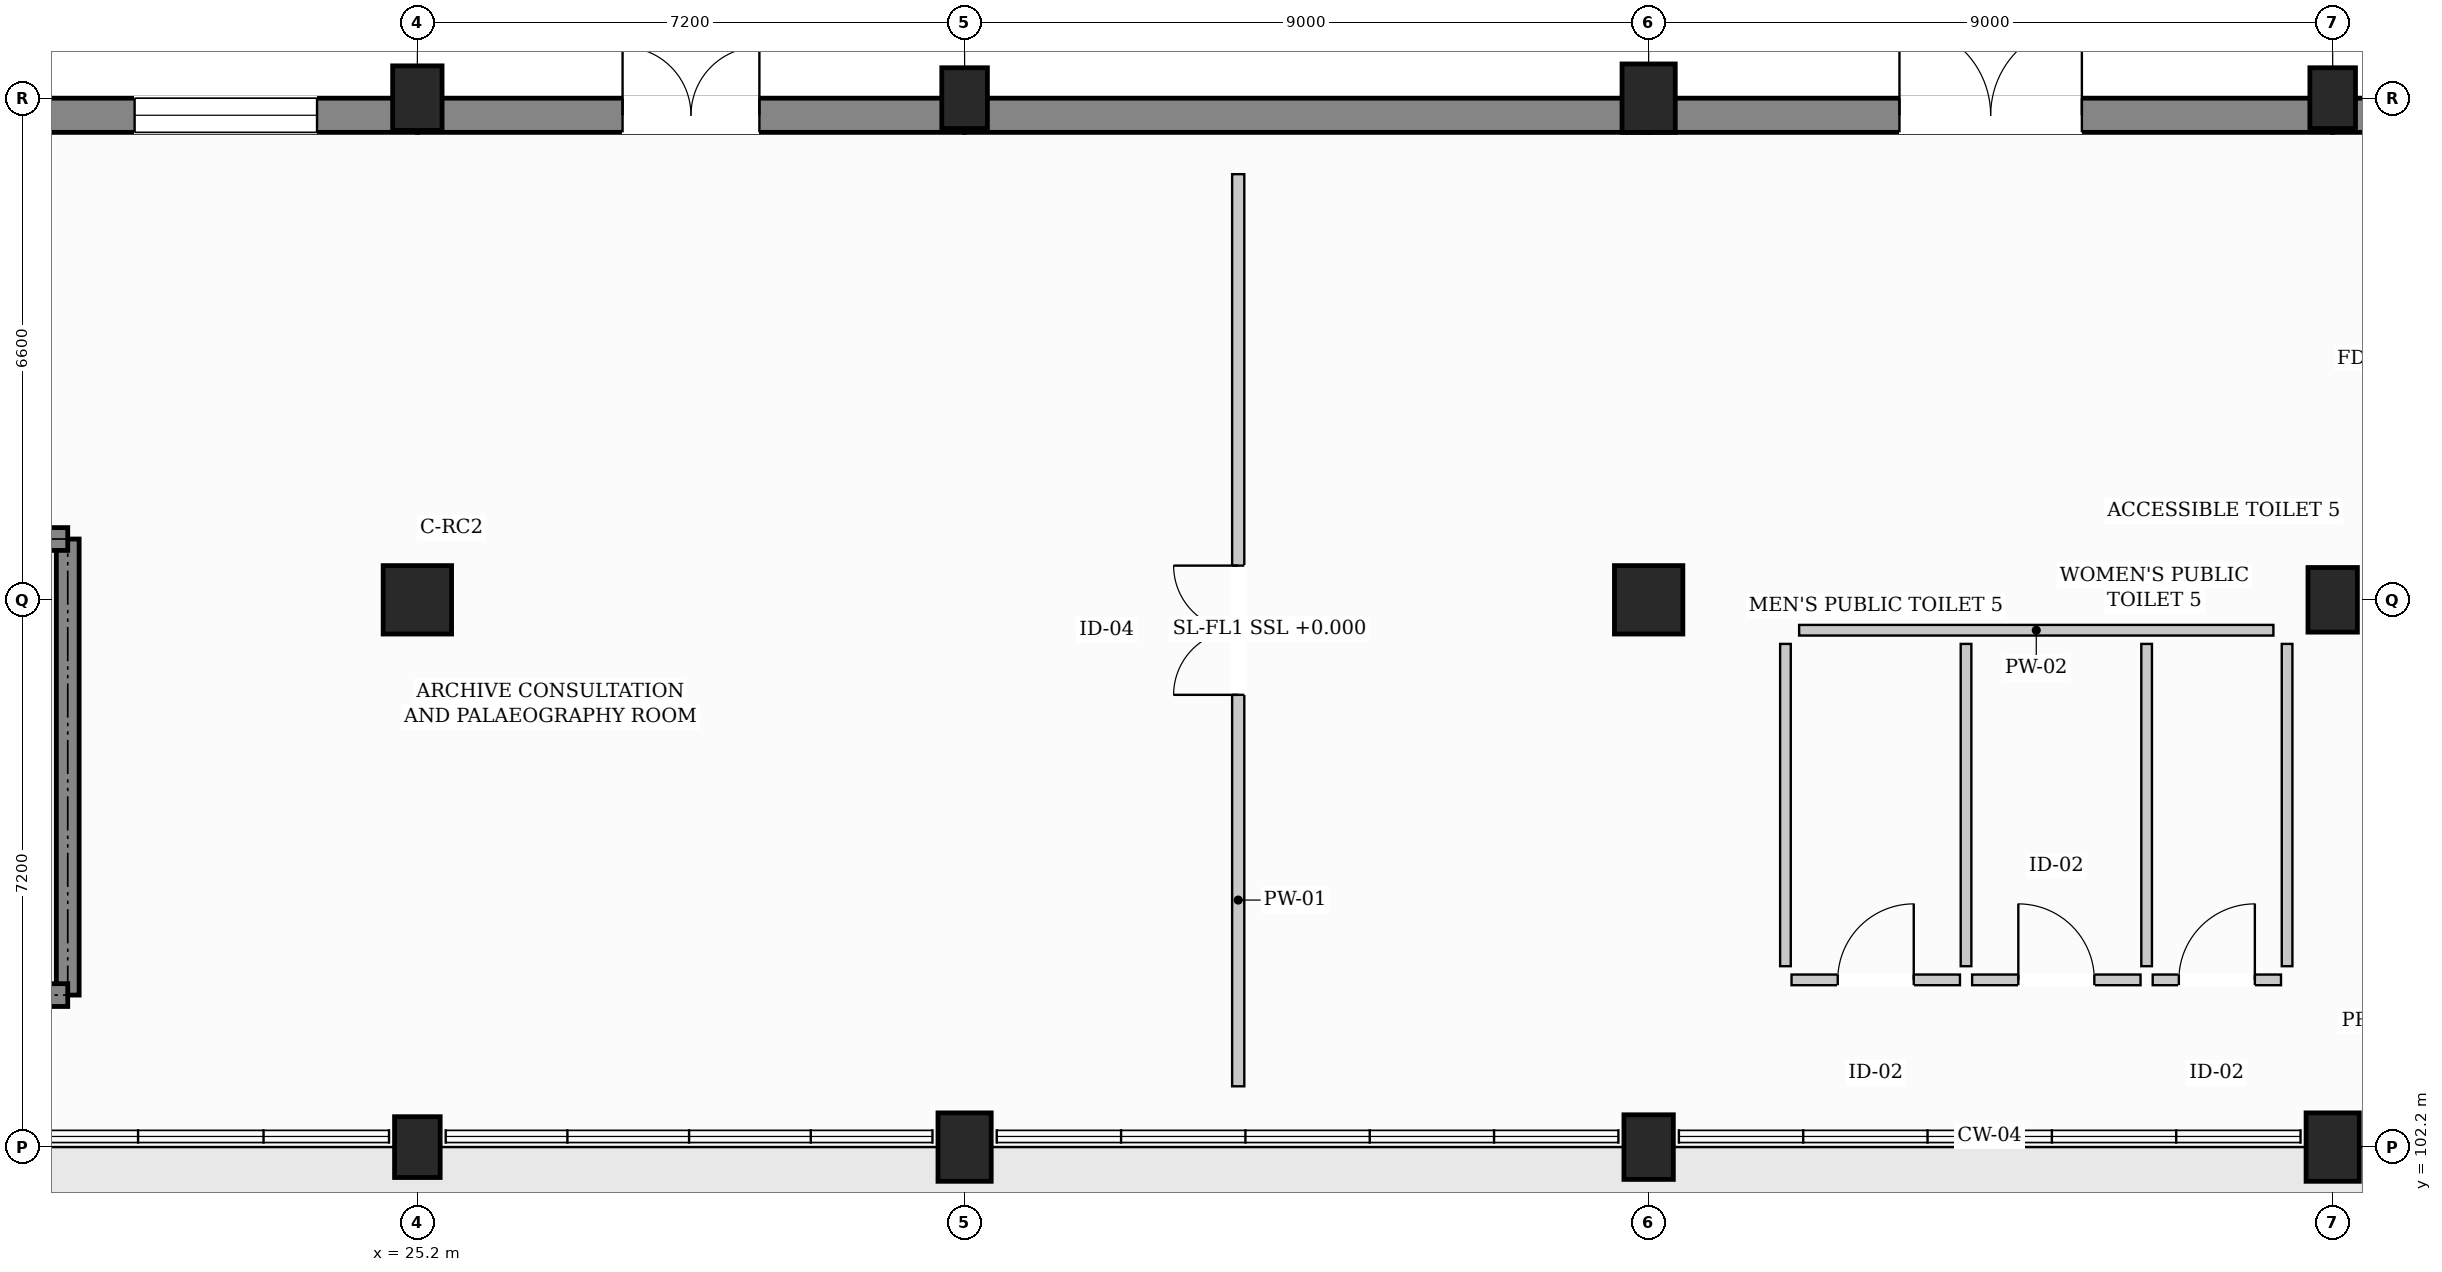
"""IFC4 building model, lengths in metres.
Left out: names, types, materials, properties, quantities, classifications, styles, units other than length and angle.
Written with IfcOpenShell. Run it as: python <this file> out.ifc"""

import sys

from ifc_helpers import new_model, si_unit, direction, frame, frame_2d, origin, origin_2d, place, context, subcontext, project, spatial, rectangle, extrude, element, fill, save


model = new_model("IFC4")
c1 = context("Model", 3, precision=1e-05, world=origin(), true_north=direction((0.0, 1.0)))
c2 = subcontext(c1, "Body", "Model", "MODEL_VIEW")
j1 = project(units=[si_unit("LENGTHUNIT", "METRE"), si_unit("PLANEANGLEUNIT", "RADIAN")], contexts=[c1])
p1 = place(None, origin())
s1 = spatial("IfcSite", under=j1, at=p1, CompositionType="ELEMENT")
p2 = place(p1, origin())
s2 = spatial("IfcBuilding", under=s1, at=p2, CompositionType="ELEMENT")
p3 = place(p2, origin())
s3 = spatial("IfcBuildingStorey", under=s2, at=p3, CompositionType="ELEMENT", Elevation=0.0)
p4 = place(p3, frame((25.2, 102.2, 0.0), z_axis=(0.0, 0.0, 1.0), x_axis=(1.0, 0.0, 0.0)))
e1 = element("IfcColumn", 1, at=p4, inside=s3, PredefinedType="COLUMN", context=c2, shape_type="SweptSolid", body=[
    extrude(rectangle(XDim=0.6, YDim=0.8, at=origin_2d()), origin(), (0.0, 0.0, 1.0), 5.1),
])
p5 = place(p3, frame((25.2, 109.4, 0.0), z_axis=(0.0, 0.0, 1.0), x_axis=(1.0, 0.0, 0.0)))
e2 = element("IfcColumn", 2, at=p5, inside=s3, PredefinedType="COLUMN", context=c2, shape_type="SweptSolid", body=[
    extrude(rectangle(XDim=0.9, YDim=0.9, at=origin_2d()), origin(), (0.0, 0.0, 1.0), 5.1),
])
p6 = place(p3, frame((25.2, 116.0, 0.0), z_axis=(0.0, 0.0, 1.0), x_axis=(1.0, 0.0, 0.0)))
e3 = element("IfcColumn", 3, at=p6, inside=s3, PredefinedType="COLUMN", context=c2, shape_type="SweptSolid", body=[
    extrude(rectangle(XDim=0.65, YDim=0.85, at=origin_2d()), origin(), (0.0, 0.0, 1.0), 5.1),
])
p7 = place(p3, frame((32.4, 102.2, 0.0), z_axis=(0.0, 0.0, 1.0), x_axis=(1.0, 0.0, 0.0)))
e4 = element("IfcColumn", 4, at=p7, inside=s3, PredefinedType="COLUMN", context=c2, shape_type="SweptSolid", body=[
    extrude(rectangle(XDim=0.7, YDim=0.9, at=origin_2d()), origin(), (0.0, 0.0, 1.0), 5.1),
])
p8 = place(p3, frame((32.4, 116.0, 0.0), z_axis=(0.0, 0.0, 1.0), x_axis=(1.0, 0.0, 0.0)))
e5 = element("IfcColumn", 5, at=p8, inside=s3, PredefinedType="COLUMN", context=c2, shape_type="SweptSolid", body=[
    extrude(rectangle(XDim=0.6, YDim=0.8, at=origin_2d()), origin(), (0.0, 0.0, 1.0), 5.1),
])
p9 = place(p3, frame((41.4, 102.2, 0.0), z_axis=(0.0, 0.0, 1.0), x_axis=(1.0, 0.0, 0.0)))
e6 = element("IfcColumn", 6, at=p9, inside=s3, PredefinedType="COLUMN", context=c2, shape_type="SweptSolid", body=[
    extrude(rectangle(XDim=0.65, YDim=0.85, at=origin_2d()), origin(), (0.0, 0.0, 1.0), 5.1),
])
p10 = place(p3, frame((41.4, 109.4, 0.0), z_axis=(0.0, 0.0, 1.0), x_axis=(1.0, 0.0, 0.0)))
e7 = element("IfcColumn", 7, at=p10, inside=s3, PredefinedType="COLUMN", context=c2, shape_type="SweptSolid", body=[
    extrude(rectangle(XDim=0.9, YDim=0.9, at=origin_2d()), origin(), (0.0, 0.0, 1.0), 5.1),
])
for number, where, z_axis, x_axis in (
    (8, (41.4, 116.0, 0.0), (0.0, 0.0, 1.0), (1.0, 0.0, 0.0)),
    (9, (50.4, 102.2, 0.0), (0.0, 0.0, 1.0), (1.0, 0.0, 0.0)),
):
    element("IfcColumn", number, at=place(p3, frame(where, z_axis=z_axis, x_axis=x_axis)), inside=s3, PredefinedType="COLUMN", context=c2, shape_type="SweptSolid", body=[
        extrude(rectangle(XDim=0.7, YDim=0.9, at=origin_2d()), origin(), (0.0, 0.0, 1.0), 5.1),
    ])
p11 = place(p3, frame((50.4, 109.4, 0.0), z_axis=(0.0, 0.0, 1.0), x_axis=(1.0, 0.0, 0.0)))
e10 = element("IfcColumn", 10, at=p11, inside=s3, PredefinedType="COLUMN", context=c2, shape_type="SweptSolid", body=[
    extrude(rectangle(XDim=0.65, YDim=0.85, at=origin_2d()), origin(), (0.0, 0.0, 1.0), 5.1),
])
p12 = place(p3, frame((50.4, 116.0, 0.0), z_axis=(0.0, 0.0, 1.0), x_axis=(1.0, 0.0, 0.0)))
e11 = element("IfcColumn", 11, at=p12, inside=s3, PredefinedType="COLUMN", context=c2, shape_type="SweptSolid", body=[
    extrude(rectangle(XDim=0.6, YDim=0.8, at=origin_2d()), origin(), (0.0, 0.0, 1.0), 5.1),
])
p13 = place(p3, frame((16.2, 115.775, 0.0), z_axis=(0.0, 0.0, 1.0), x_axis=(1.0, 0.0, 0.0)))
e12 = element("IfcWall", 12, at=p13, inside=s3, PredefinedType="SOLIDWALL", context=c2, shape_type="SweptSolid", body=[
    extrude(rectangle(XDim=9.0, YDim=0.45, at=frame_2d((4.5, 0.0))), origin(), (0.0, 0.0, 1.0), 4.82),
])
p14 = place(p13, frame((1.32, 0.0, 0.85)))
e13 = element("IfcOpeningElement", 13, at=p14, cuts=e12, PredefinedType="OPENING", context=c2, shape_type="SweptSolid", body=[
    extrude(rectangle(XDim=2.4, YDim=2.8, at=frame_2d((1.2, 1.4))), frame((0.0, 0.235, 0.0), z_axis=(0.0, -1.0, 0.0), x_axis=(1.0, 0.0, 0.0)), (0.0, 0.0, 1.0), 0.47),
])
p15 = place(p13, frame((5.28, 0.0, 0.85)))
e14 = element("IfcOpeningElement", 14, at=p15, cuts=e12, PredefinedType="OPENING", context=c2, shape_type="SweptSolid", body=[
    extrude(rectangle(XDim=2.4, YDim=2.8, at=frame_2d((1.2, 1.4))), frame((0.0, 0.235, 0.0), z_axis=(0.0, -1.0, 0.0), x_axis=(1.0, 0.0, 0.0)), (0.0, 0.0, 1.0), 0.47),
])
p16 = place(p3, frame((25.2, 115.775, 0.0), z_axis=(0.0, 0.0, 1.0), x_axis=(1.0, 0.0, 0.0)))
e15 = element("IfcWall", 15, at=p16, inside=s3, PredefinedType="SOLIDWALL", context=c2, shape_type="SweptSolid", body=[
    extrude(rectangle(XDim=7.2, YDim=0.45, at=frame_2d((3.6, 0.0))), origin(), (0.0, 0.0, 1.0), 4.82),
])
p17 = place(p16, frame((2.7, 0.0, 0.0)))
e16 = element("IfcOpeningElement", 16, at=p17, cuts=e15, PredefinedType="OPENING", context=c2, shape_type="SweptSolid", body=[
    extrude(rectangle(XDim=1.8, YDim=2.4, at=frame_2d((0.9, 1.2))), frame((0.0, 0.235, 0.0), z_axis=(0.0, -1.0, 0.0), x_axis=(1.0, 0.0, 0.0)), (0.0, 0.0, 1.0), 0.47),
])
p18 = place(p3, frame((32.4, 115.775, 0.0), z_axis=(0.0, 0.0, 1.0), x_axis=(1.0, 0.0, 0.0)))
e17 = element("IfcWall", 17, at=p18, inside=s3, PredefinedType="SOLIDWALL", context=c2, shape_type="SweptSolid", body=[
    extrude(rectangle(XDim=9.0, YDim=0.45, at=frame_2d((4.5, 0.0))), origin(), (0.0, 0.0, 1.0), 4.82),
])
p19 = place(p3, frame((41.4, 115.775, 0.0), z_axis=(0.0, 0.0, 1.0), x_axis=(1.0, 0.0, 0.0)))
e18 = element("IfcWall", 18, at=p19, inside=s3, PredefinedType="SOLIDWALL", context=c2, shape_type="SweptSolid", body=[
    extrude(rectangle(XDim=9.0, YDim=0.45, at=frame_2d((4.5, 0.0))), origin(), (0.0, 0.0, 1.0), 4.82),
])
p20 = place(p19, frame((3.3, 0.0, 0.0)))
e19 = element("IfcOpeningElement", 19, at=p20, cuts=e18, PredefinedType="OPENING", context=c2, shape_type="SweptSolid", body=[
    extrude(rectangle(XDim=2.4, YDim=2.7, at=frame_2d((1.2, 1.35))), frame((0.0, 0.235, 0.0), z_axis=(0.0, -1.0, 0.0), x_axis=(1.0, 0.0, 0.0)), (0.0, 0.0, 1.0), 0.47),
])
p21 = place(p3, frame((50.4, 115.775, 0.0), z_axis=(0.0, 0.0, 1.0), x_axis=(1.0, 0.0, 0.0)))
e20 = element("IfcWall", 20, at=p21, inside=s3, PredefinedType="SOLIDWALL", context=c2, shape_type="SweptSolid", body=[
    extrude(rectangle(XDim=7.2, YDim=0.45, at=frame_2d((3.6, 0.0))), origin(), (0.0, 0.0, 1.0), 4.82),
])
p22 = place(p21, frame((1.066, 0.0, 0.85)))
e21 = element("IfcOpeningElement", 21, at=p22, cuts=e20, PredefinedType="OPENING", context=c2, shape_type="SweptSolid", body=[
    extrude(rectangle(XDim=1.9, YDim=2.5, at=frame_2d((0.95, 1.25))), frame((0.0, 0.235, 0.0), z_axis=(0.0, -1.0, 0.0), x_axis=(1.0, 0.0, 0.0)), (0.0, 0.0, 1.0), 0.47),
])
p23 = place(p21, frame((4.234, 0.0, 0.85)))
e22 = element("IfcOpeningElement", 22, at=p23, cuts=e20, PredefinedType="OPENING", context=c2, shape_type="SweptSolid", body=[
    extrude(rectangle(XDim=1.9, YDim=2.5, at=frame_2d((0.95, 1.25))), frame((0.0, 0.235, 0.0), z_axis=(0.0, -1.0, 0.0), x_axis=(1.0, 0.0, 0.0)), (0.0, 0.0, 1.0), 0.47),
])
p24 = place(p3, frame((20.6, 104.2, 0.0), z_axis=(0.0, 0.0, 1.0), x_axis=(0.0, 1.0, 0.0)))
e23 = element("IfcWall", 23, at=p24, inside=s3, PredefinedType="SHEAR", context=c2, shape_type="SweptSolid", body=[
    extrude(rectangle(XDim=6.0, YDim=0.3, at=frame_2d((3.0, 0.0))), origin(), (0.0, 0.0, 1.0), 4.82),
])
for number, where, z_axis, x_axis in (
    (24, (13.6, 104.2, 0.0), (0.0, 0.0, 1.0), (1.0, 0.0, 0.0)),
    (25, (13.6, 110.2, 0.0), (0.0, 0.0, 1.0), (1.0, 0.0, 0.0)),
):
    element("IfcWall", number, at=place(p3, frame(where, z_axis=z_axis, x_axis=x_axis)), inside=s3, PredefinedType="SHEAR", context=c2, shape_type="SweptSolid", body=[
        extrude(rectangle(XDim=7.0, YDim=0.3, at=frame_2d((3.5, 0.0))), origin(), (0.0, 0.0, 1.0), 4.82),
    ])
p25 = place(p3, frame((43.38, 109.0, 0.0), z_axis=(0.0, 0.0, 1.0), x_axis=(1.0, 0.0, 0.0)))
e26 = element("IfcWall", 26, at=p25, inside=s3, PredefinedType="PARTITIONING", context=c2, shape_type="SweptSolid", body=[
    extrude(rectangle(XDim=6.24, YDim=0.14, at=frame_2d((3.12, 0.0))), origin(), (0.0, 0.0, 1.0), 4.6),
])
for number, where, z_axis, x_axis in (
    (27, (43.2, 104.58, 0.0), (0.0, 0.0, 1.0), (0.0, 1.0, 0.0)),
    (28, (49.8, 104.58, 0.0), (0.0, 0.0, 1.0), (0.0, 1.0, 0.0)),
    (29, (45.576, 104.58, 0.0), (0.0, 0.0, 1.0), (0.0, 1.0, 0.0)),
    (30, (47.952, 104.58, 0.0), (0.0, 0.0, 1.0), (0.0, 1.0, 0.0)),
):
    element("IfcWall", number, at=place(p3, frame(where, z_axis=z_axis, x_axis=x_axis)), inside=s3, PredefinedType="PARTITIONING", context=c2, shape_type="SweptSolid", body=[
        extrude(rectangle(XDim=4.24, YDim=0.14, at=frame_2d((2.12, 0.0))), origin(), (0.0, 0.0, 1.0), 4.82),
    ])
p26 = place(p3, frame((43.28, 104.4, 0.0), z_axis=(0.0, 0.0, 1.0), x_axis=(1.0, 0.0, 0.0)))
e31 = element("IfcWall", 31, at=p26, inside=s3, PredefinedType="PARTITIONING", context=c2, shape_type="SweptSolid", body=[
    extrude(rectangle(XDim=2.216, YDim=0.14, at=frame_2d((1.108, 0.0))), origin(), (0.0, 0.0, 1.0), 4.82),
])
p27 = place(p26, frame((0.608, 0.0, 0.0)))
e32 = element("IfcOpeningElement", 32, at=p27, cuts=e31, PredefinedType="OPENING", context=c2, shape_type="SweptSolid", body=[
    extrude(rectangle(XDim=1.0, YDim=2.15, at=frame_2d((0.5, 1.075))), frame((0.0, 0.08, 0.0), z_axis=(0.0, -1.0, 0.0), x_axis=(1.0, 0.0, 0.0)), (0.0, 0.0, 1.0), 0.16),
])
p28 = place(p3, frame((45.656, 104.4, 0.0), z_axis=(0.0, 0.0, 1.0), x_axis=(1.0, 0.0, 0.0)))
e33 = element("IfcWall", 33, at=p28, inside=s3, PredefinedType="PARTITIONING", context=c2, shape_type="SweptSolid", body=[
    extrude(rectangle(XDim=2.216, YDim=0.14, at=frame_2d((1.108, 0.0))), origin(), (0.0, 0.0, 1.0), 4.6),
])
p29 = place(p28, frame((0.608, 0.0, 0.0)))
e34 = element("IfcOpeningElement", 34, at=p29, cuts=e33, PredefinedType="OPENING", context=c2, shape_type="SweptSolid", body=[
    extrude(rectangle(XDim=1.0, YDim=2.15, at=frame_2d((0.5, 1.075))), frame((0.0, 0.08, 0.0), z_axis=(0.0, -1.0, 0.0), x_axis=(1.0, 0.0, 0.0)), (0.0, 0.0, 1.0), 0.16),
])
p30 = place(p3, frame((48.032, 104.4, 0.0), z_axis=(0.0, 0.0, 1.0), x_axis=(1.0, 0.0, 0.0)))
e35 = element("IfcWall", 35, at=p30, inside=s3, PredefinedType="PARTITIONING", context=c2, shape_type="SweptSolid", body=[
    extrude(rectangle(XDim=1.688, YDim=0.14, at=frame_2d((0.844, 0.0))), origin(), (0.0, 0.0, 1.0), 4.82),
])
p31 = place(p30, frame((0.344, 0.0, 0.0)))
e36 = element("IfcOpeningElement", 36, at=p31, cuts=e35, PredefinedType="OPENING", context=c2, shape_type="SweptSolid", body=[
    extrude(rectangle(XDim=1.0, YDim=2.15, at=frame_2d((0.5, 1.075))), frame((0.0, 0.08, 0.0), z_axis=(0.0, -1.0, 0.0), x_axis=(1.0, 0.0, 0.0)), (0.0, 0.0, 1.0), 0.16),
])
p32 = place(p3, frame((36.0, 103.0, 0.0), z_axis=(0.0, 0.0, 1.0), x_axis=(0.0, 1.0, 0.0)))
e37 = element("IfcWall", 37, at=p32, inside=s3, PredefinedType="PARTITIONING", context=c2, shape_type="SweptSolid", body=[
    extrude(rectangle(XDim=12.0, YDim=0.16, at=frame_2d((6.0, 0.0))), origin(), (0.0, 0.0, 1.0), 3.17),
])
p33 = place(p32, frame((5.15, 0.0, 0.0)))
e38 = element("IfcOpeningElement", 38, at=p33, cuts=e37, PredefinedType="OPENING", context=c2, shape_type="SweptSolid", body=[
    extrude(rectangle(XDim=1.7, YDim=2.3, at=frame_2d((0.85, 1.15))), frame((0.0, 0.09, 0.0), z_axis=(0.0, -1.0, 0.0), x_axis=(1.0, 0.0, 0.0)), (0.0, 0.0, 1.0), 0.18),
])
p34 = place(p15, origin())
e39 = element("IfcWindow", 39, at=p34, inside=s3, PartitioningType="TRIPLE_PANEL_VERTICAL", PredefinedType="WINDOW", context=c2, shape_type="SweptSolid", body=[
    extrude(rectangle(XDim=2.4, YDim=2.8, at=frame_2d((1.2, 1.4))), frame((0.0, 0.03, 0.0), z_axis=(0.0, -1.0, 0.0), x_axis=(1.0, 0.0, 0.0)), (0.0, 0.0, 1.0), 0.06),
])
fill(e14, e39)
p35 = place(p17, origin())
e40 = element("IfcDoor", 40, at=p35, inside=s3, OperationType="DOUBLE_DOOR_SINGLE_SWING", PredefinedType="DOOR", context=c2, shape_type="SweptSolid", body=[
    extrude(rectangle(XDim=1.8, YDim=2.4, at=frame_2d((0.9, 1.2))), frame((0.0, 0.025, 0.0), z_axis=(0.0, -1.0, 0.0), x_axis=(1.0, 0.0, 0.0)), (0.0, 0.0, 1.0), 0.05),
])
fill(e16, e40)
p36 = place(p20, origin())
e41 = element("IfcDoor", 41, at=p36, inside=s3, OperationType="DOUBLE_DOOR_SINGLE_SWING", PredefinedType="DOOR", context=c2, shape_type="SweptSolid", body=[
    extrude(rectangle(XDim=2.4, YDim=2.7, at=frame_2d((1.2, 1.35))), frame((0.0, 0.025, 0.0), z_axis=(0.0, -1.0, 0.0), x_axis=(1.0, 0.0, 0.0)), (0.0, 0.0, 1.0), 0.05),
])
fill(e19, e41)
p37 = place(p27, origin())
e42 = element("IfcDoor", 42, at=p37, inside=s3, OperationType="SINGLE_SWING_RIGHT", PredefinedType="DOOR", context=c2, shape_type="SweptSolid", body=[
    extrude(rectangle(XDim=1.0, YDim=2.15, at=frame_2d((0.5, 1.075))), frame((0.0, 0.025, 0.0), z_axis=(0.0, -1.0, 0.0), x_axis=(1.0, 0.0, 0.0)), (0.0, 0.0, 1.0), 0.05),
])
fill(e32, e42)
p38 = place(p29, origin())
e43 = element("IfcDoor", 43, at=p38, inside=s3, OperationType="SINGLE_SWING_LEFT", PredefinedType="DOOR", context=c2, shape_type="SweptSolid", body=[
    extrude(rectangle(XDim=1.0, YDim=2.15, at=frame_2d((0.5, 1.075))), frame((0.0, 0.025, 0.0), z_axis=(0.0, -1.0, 0.0), x_axis=(1.0, 0.0, 0.0)), (0.0, 0.0, 1.0), 0.05),
])
fill(e34, e43)
p39 = place(p31, origin())
e44 = element("IfcDoor", 44, at=p39, inside=s3, OperationType="SINGLE_SWING_RIGHT", PredefinedType="DOOR", context=c2, shape_type="SweptSolid", body=[
    extrude(rectangle(XDim=1.0, YDim=2.15, at=frame_2d((0.5, 1.075))), frame((0.0, 0.025, 0.0), z_axis=(0.0, -1.0, 0.0), x_axis=(1.0, 0.0, 0.0)), (0.0, 0.0, 1.0), 0.05),
])
fill(e36, e44)
p40 = place(p33, origin())
e45 = element("IfcDoor", 45, at=p40, inside=s3, OperationType="DOUBLE_DOOR_SINGLE_SWING", PredefinedType="DOOR", context=c2, shape_type="SweptSolid", body=[
    extrude(rectangle(XDim=1.7, YDim=2.3, at=frame_2d((0.85, 1.15))), frame((0.0, 0.025, 0.0), z_axis=(0.0, -1.0, 0.0), x_axis=(1.0, 0.0, 0.0)), (0.0, 0.0, 1.0), 0.05),
])
fill(e38, e45)
save(model, sys.argv[1])
